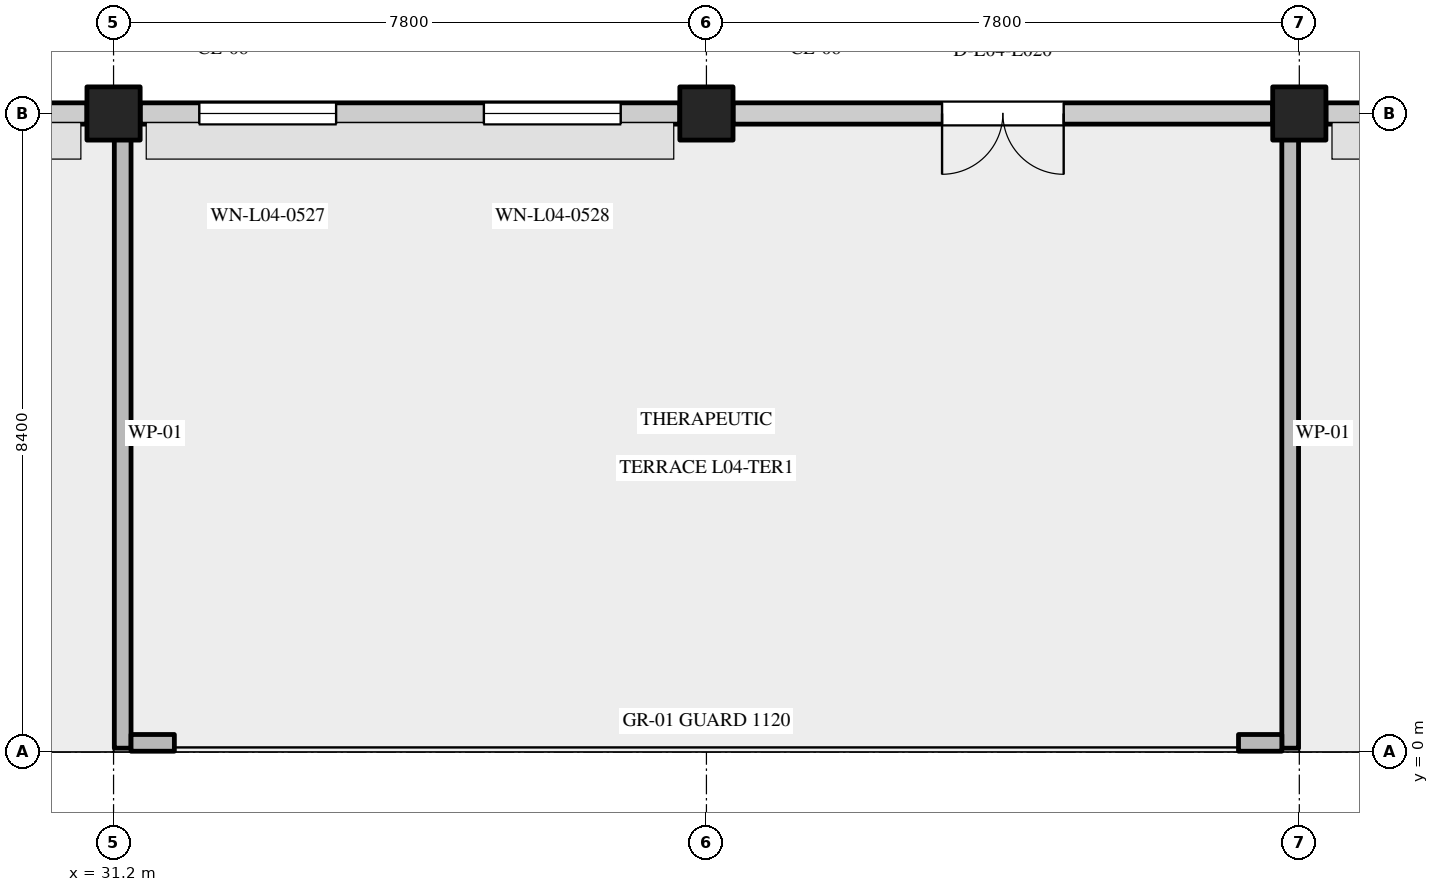
"""IFC4 building model, lengths in metres.
Left out: names, types, materials, properties, quantities, classifications, styles, units other than length and angle.
Written with IfcOpenShell. Run it as: python <this file> out.ifc"""

import sys

from ifc_helpers import new_model, si_unit, direction, frame, frame_2d, origin, origin_2d, place, context, subcontext, project, spatial, rectangle, extrude, element, fill, save


model = new_model("IFC4")
c1 = context("Model", 3, precision=1e-05, world=origin(), true_north=direction((0.0, 1.0)))
c2 = subcontext(c1, "Body", "Model", "MODEL_VIEW")
j1 = project(units=[si_unit("LENGTHUNIT", "METRE"), si_unit("PLANEANGLEUNIT", "RADIAN")], contexts=[c1])
p1 = place(None, origin())
s1 = spatial("IfcSite", under=j1, at=p1, CompositionType="ELEMENT")
p2 = place(p1, origin())
s2 = spatial("IfcBuilding", under=s1, at=p2, CompositionType="ELEMENT")
p3 = place(p2, frame((0.0, 0.0, 18.0)))
s3 = spatial("IfcBuildingStorey", under=s2, at=p3, CompositionType="ELEMENT", Elevation=18.0)
for number, where, z_axis, x_axis in (
    (1, (31.2, 8.4, 0.0), (0.0, 0.0, 1.0), (1.0, 0.0, 0.0)),
    (2, (39.0, 8.4, 0.0), (0.0, 0.0, 1.0), (1.0, 0.0, 0.0)),
    (3, (46.8, 8.4, 0.0), (0.0, 0.0, 1.0), (1.0, 0.0, 0.0)),
):
    element("IfcColumn", number, at=place(p3, frame(where, z_axis=z_axis, x_axis=x_axis)), inside=s3, PredefinedType="COLUMN", context=c2, shape_type="SweptSolid", body=[
        extrude(rectangle(XDim=0.7, YDim=0.7, at=origin_2d()), origin(), (0.0, 0.0, 1.0), 4.2),
    ])
p4 = place(p3, frame((23.775, 8.4, 0.0), z_axis=(0.0, 0.0, 1.0), x_axis=(1.0, 0.0, 0.0)))
e4 = element("IfcWall", 4, at=p4, inside=s3, PredefinedType="STANDARD", context=c2, shape_type="SweptSolid", body=[
    extrude(rectangle(XDim=7.075, YDim=0.28, at=frame_2d((3.538, 0.0))), origin(), (0.0, 0.0, 1.0), 3.235),
])
p5 = place(p4, frame((0.753, 0.0, 0.8)))
e5 = element("IfcOpeningElement", 5, at=p5, cuts=e4, PredefinedType="OPENING", context=c2, shape_type="SweptSolid", body=[
    extrude(rectangle(XDim=1.8, YDim=1.65, at=frame_2d((0.9, 0.825))), frame((0.0, 0.152, 0.0), z_axis=(0.0, -1.0, 0.0), x_axis=(1.0, 0.0, 0.0)), (0.0, 0.0, 1.0), 0.304),
])
p6 = place(p4, frame((4.497, 0.0, 0.8)))
e6 = element("IfcOpeningElement", 6, at=p6, cuts=e4, PredefinedType="OPENING", context=c2, shape_type="SweptSolid", body=[
    extrude(rectangle(XDim=1.8, YDim=1.65, at=frame_2d((0.9, 0.825))), frame((0.0, 0.152, 0.0), z_axis=(0.0, -1.0, 0.0), x_axis=(1.0, 0.0, 0.0)), (0.0, 0.0, 1.0), 0.304),
])
p7 = place(p3, frame((31.55, 8.4, 0.0), z_axis=(0.0, 0.0, 1.0), x_axis=(1.0, 0.0, 0.0)))
e7 = element("IfcWall", 7, at=p7, inside=s3, PredefinedType="STANDARD", context=c2, shape_type="SweptSolid", body=[
    extrude(rectangle(XDim=7.1, YDim=0.28, at=frame_2d((3.55, 0.0))), origin(), (0.0, 0.0, 1.0), 3.235),
])
p8 = place(p7, frame((0.778, 0.0, 0.8)))
e8 = element("IfcOpeningElement", 8, at=p8, cuts=e7, PredefinedType="OPENING", context=c2, shape_type="SweptSolid", body=[
    extrude(rectangle(XDim=1.8, YDim=1.55, at=frame_2d((0.9, 0.775))), frame((0.0, 0.152, 0.0), z_axis=(0.0, -1.0, 0.0), x_axis=(1.0, 0.0, 0.0)), (0.0, 0.0, 1.0), 0.304),
])
p9 = place(p7, frame((4.522, 0.0, 0.8)))
e9 = element("IfcOpeningElement", 9, at=p9, cuts=e7, PredefinedType="OPENING", context=c2, shape_type="SweptSolid", body=[
    extrude(rectangle(XDim=1.8, YDim=1.55, at=frame_2d((0.9, 0.775))), frame((0.0, 0.152, 0.0), z_axis=(0.0, -1.0, 0.0), x_axis=(1.0, 0.0, 0.0)), (0.0, 0.0, 1.0), 0.304),
])
p10 = place(p3, frame((39.35, 8.4, 0.0), z_axis=(0.0, 0.0, 1.0), x_axis=(1.0, 0.0, 0.0)))
e10 = element("IfcWall", 10, at=p10, inside=s3, PredefinedType="STANDARD", context=c2, shape_type="SweptSolid", body=[
    extrude(rectangle(XDim=7.1, YDim=0.28, at=frame_2d((3.55, 0.0))), origin(), (0.0, 0.0, 1.0), 3.235),
])
p11 = place(p10, frame((2.75, 0.0, 0.0)))
e11 = element("IfcOpeningElement", 11, at=p11, cuts=e10, PredefinedType="OPENING", context=c2, shape_type="SweptSolid", body=[
    extrude(rectangle(XDim=1.6, YDim=2.15, at=frame_2d((0.8, 1.075))), frame((0.0, 0.152, 0.0), z_axis=(0.0, -1.0, 0.0), x_axis=(1.0, 0.0, 0.0)), (0.0, 0.0, 1.0), 0.304),
])
p12 = place(p3, frame((47.15, 8.4, 0.0), z_axis=(0.0, 0.0, 1.0), x_axis=(1.0, 0.0, 0.0)))
e12 = element("IfcWall", 12, at=p12, inside=s3, PredefinedType="STANDARD", context=c2, shape_type="SweptSolid", body=[
    extrude(rectangle(XDim=7.075, YDim=0.28, at=frame_2d((3.538, 0.0))), origin(), (0.0, 0.0, 1.0), 3.235),
])
p13 = place(p12, frame((0.628, 0.0, 0.8)))
e13 = element("IfcOpeningElement", 13, at=p13, cuts=e12, PredefinedType="OPENING", context=c2, shape_type="SweptSolid", body=[
    extrude(rectangle(XDim=2.1, YDim=1.75, at=frame_2d((1.05, 0.875))), frame((0.0, 0.152, 0.0), z_axis=(0.0, -1.0, 0.0), x_axis=(1.0, 0.0, 0.0)), (0.0, 0.0, 1.0), 0.304),
])
p14 = place(p12, frame((4.372, 0.0, 0.8)))
e14 = element("IfcOpeningElement", 14, at=p14, cuts=e12, PredefinedType="OPENING", context=c2, shape_type="SweptSolid", body=[
    extrude(rectangle(XDim=2.1, YDim=1.75, at=frame_2d((1.05, 0.875))), frame((0.0, 0.152, 0.0), z_axis=(0.0, -1.0, 0.0), x_axis=(1.0, 0.0, 0.0)), (0.0, 0.0, 1.0), 0.304),
])
for number, where, z_axis, x_axis in (
    (15, (31.32, 0.05, 0.0), (0.0, 0.0, 1.0), (0.0, 1.0, 0.0)),
    (16, (46.68, 0.05, 0.0), (0.0, 0.0, 1.0), (0.0, 1.0, 0.0)),
):
    element("IfcWall", number, at=place(p3, frame(where, z_axis=z_axis, x_axis=x_axis)), inside=s3, PredefinedType="PARAPET", context=c2, shape_type="SweptSolid", body=[
        extrude(rectangle(XDim=8.3, YDim=0.22, at=frame_2d((4.15, 0.0))), origin(), (0.0, 0.0, 1.0), 1.15),
    ])
for number, where, z_axis, x_axis in (
    (17, (31.43, 0.12, 0.0), (0.0, 0.0, 1.0), (1.0, 0.0, 0.0)),
    (18, (46.0, 0.12, 0.0), (0.0, 0.0, 1.0), (1.0, 0.0, 0.0)),
):
    element("IfcWall", number, at=place(p3, frame(where, z_axis=z_axis, x_axis=x_axis)), inside=s3, PredefinedType="PARAPET", context=c2, shape_type="SweptSolid", body=[
        extrude(rectangle(XDim=0.57, YDim=0.22, at=frame_2d((0.285, 0.0))), origin(), (0.0, 0.0, 1.0), 1.15),
    ])
p15 = place(p8, origin())
e19 = element("IfcWindow", 19, at=p15, inside=s3, PartitioningType="DOUBLE_PANEL_VERTICAL", PredefinedType="WINDOW", context=c2, shape_type="SweptSolid", body=[
    extrude(rectangle(XDim=1.8, YDim=1.55, at=frame_2d((0.9, 0.775))), frame((0.0, 0.03, 0.0), z_axis=(0.0, -1.0, 0.0), x_axis=(1.0, 0.0, 0.0)), (0.0, 0.0, 1.0), 0.06),
])
fill(e8, e19)
p16 = place(p9, origin())
e20 = element("IfcWindow", 20, at=p16, inside=s3, PartitioningType="DOUBLE_PANEL_VERTICAL", PredefinedType="WINDOW", context=c2, shape_type="SweptSolid", body=[
    extrude(rectangle(XDim=1.8, YDim=1.55, at=frame_2d((0.9, 0.775))), frame((0.0, 0.03, 0.0), z_axis=(0.0, -1.0, 0.0), x_axis=(1.0, 0.0, 0.0)), (0.0, 0.0, 1.0), 0.06),
])
fill(e9, e20)
p17 = place(p11, frame((1.6, 0.0, 0.0), z_axis=(0.0, 0.0, 1.0), x_axis=(-1.0, 0.0, 0.0)))
e21 = element("IfcDoor", 21, at=p17, inside=s3, OperationType="DOUBLE_DOOR_SINGLE_SWING", PredefinedType="DOOR", context=c2, shape_type="SweptSolid", body=[
    extrude(rectangle(XDim=1.6, YDim=2.15, at=frame_2d((0.8, 1.075))), frame((0.0, 0.025, 0.0), z_axis=(0.0, -1.0, 0.0), x_axis=(1.0, 0.0, 0.0)), (0.0, 0.0, 1.0), 0.05),
])
fill(e11, e21)
save(model, sys.argv[1])
